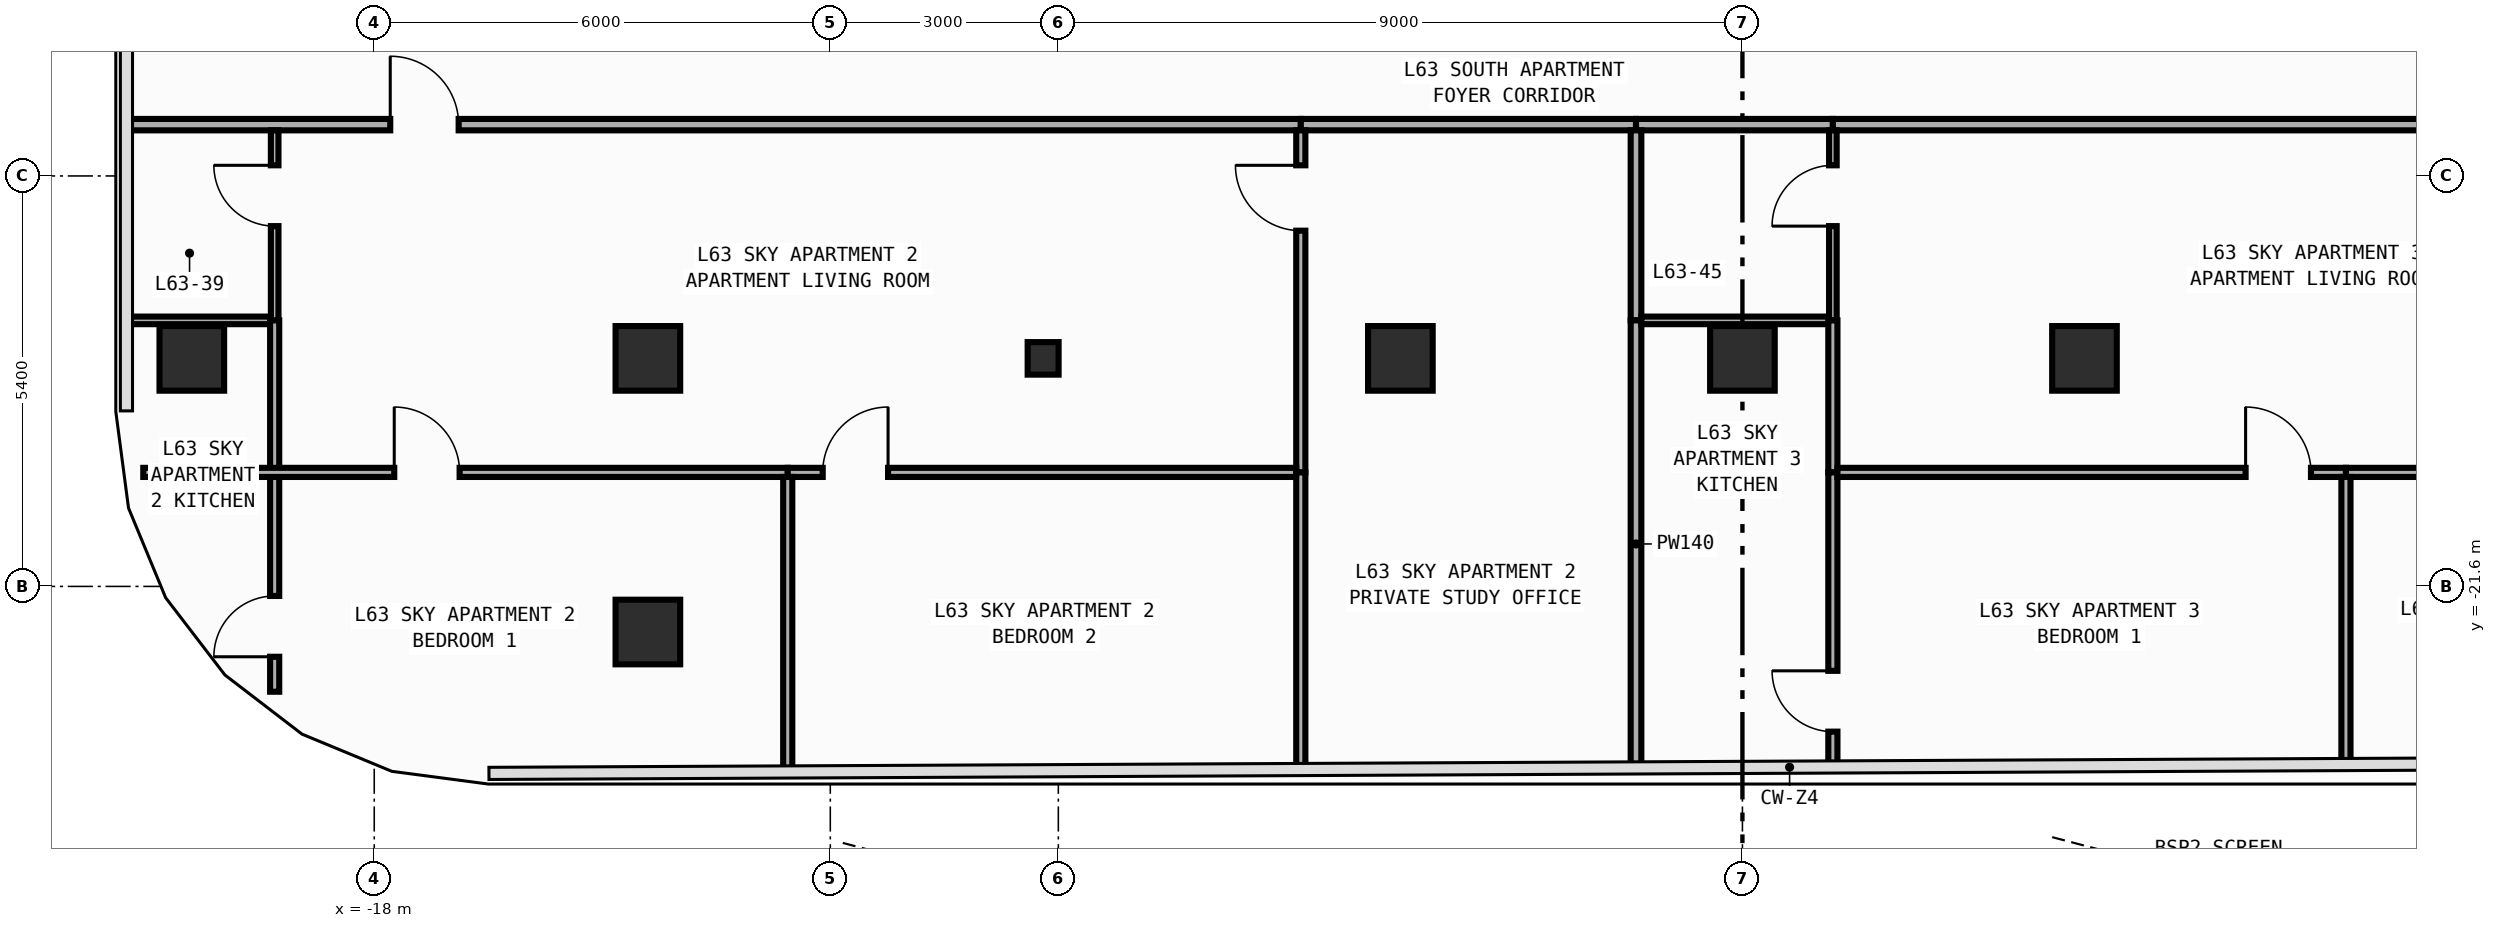
"""IFC4 building model, lengths in metres.
Left out: names, types, materials, properties, quantities, classifications, styles, units other than length and angle.
Written with IfcOpenShell. Run it as: python <this file> out.ifc"""

import sys

from ifc_helpers import new_model, si_unit, direction, frame, frame_2d, origin, origin_2d, place, context, subcontext, project, spatial, rectangle, i_section, extrude, element, fill, save


model = new_model("IFC4")
c1 = context("Model", 3, precision=1e-05, world=origin(), true_north=direction((0.0, 1.0)))
c2 = subcontext(c1, "Body", "Model", "MODEL_VIEW")
j1 = project(units=[si_unit("LENGTHUNIT", "METRE"), si_unit("PLANEANGLEUNIT", "RADIAN")], contexts=[c1])
p1 = place(None, origin())
s1 = spatial("IfcSite", under=j1, at=p1, CompositionType="ELEMENT")
p2 = place(p1, origin())
s2 = spatial("IfcBuilding", under=s1, at=p2, CompositionType="ELEMENT")
p3 = place(p2, frame((0.0, 0.0, 265.6)))
s3 = spatial("IfcBuildingStorey", under=s2, at=p3, CompositionType="ELEMENT", Elevation=265.6)
p4 = place(p3, frame((-9.2, -18.6, 0.0), z_axis=(0.0, 0.0, 1.0), x_axis=(1.0, 0.0, 0.0)))
e1 = element("IfcColumn", 1, at=p4, inside=s3, PredefinedType="COLUMN", context=c2, shape_type="SweptSolid", body=[
    extrude(i_section(OverallWidth=0.407, OverallDepth=0.428, WebThickness=0.02, FlangeThickness=0.035, FilletRadius=0.022, at=origin_2d()), origin(), (0.0, 0.0, 1.0), 3.6),
])
for number, where, z_axis, x_axis in (
    (2, (-20.4, -18.6, 0.0), (0.0, 0.0, 1.0), (1.0, 0.0, 0.0)),
    (3, (-14.4, -18.6, 0.0), (0.0, 0.0, 1.0), (1.0, 0.0, 0.0)),
    (4, (-4.5, -18.6, 0.0), (0.0, 0.0, 1.0), (1.0, 0.0, 0.0)),
    (5, (0.0, -18.6, 0.0), (0.0, 0.0, 1.0), (1.0, 0.0, 0.0)),
    (6, (4.5, -18.6, 0.0), (0.0, 0.0, 1.0), (1.0, 0.0, 0.0)),
    (7, (-14.4, -22.2, 0.0), (0.0, 0.0, 1.0), (1.0, 0.0, 0.0)),
):
    element("IfcColumn", number, at=place(p3, frame(where, z_axis=z_axis, x_axis=x_axis)), inside=s3, PredefinedType="COLUMN", context=c2, shape_type="SweptSolid", body=[
        extrude(rectangle(XDim=0.85, YDim=0.85, at=origin_2d()), origin(), (0.0, 0.0, 1.0), 3.6),
    ])
p5 = place(p3, frame((-21.255, -15.525, 0.0), z_axis=(0.0, 0.0, 1.0), x_axis=(1.0, 0.0, 0.0)))
e8 = element("IfcWall", 8, at=p5, inside=s3, PredefinedType="PARTITIONING", context=c2, shape_type="SweptSolid", body=[
    extrude(rectangle(XDim=15.445, YDim=0.15, at=frame_2d((7.722, 0.0))), origin(), (0.0, 0.0, 1.0), 3.34),
])
p6 = place(p5, frame((3.466, 0.0, 0.0)))
e9 = element("IfcOpeningElement", 9, at=p6, cuts=e8, PredefinedType="OPENING", context=c2, shape_type="SweptSolid", body=[
    extrude(rectangle(XDim=0.9, YDim=2.15, at=frame_2d((0.45, 1.075))), frame((0.0, 0.085, 0.0), z_axis=(0.0, -1.0, 0.0), x_axis=(1.0, 0.0, 0.0)), (0.0, 0.0, 1.0), 0.17),
])
p7 = place(p3, frame((-5.81, -15.525, 0.0), z_axis=(0.0, 0.0, 1.0), x_axis=(1.0, 0.0, 0.0)))
e10 = element("IfcWall", 10, at=p7, inside=s3, PredefinedType="PARTITIONING", context=c2, shape_type="SweptSolid", body=[
    extrude(rectangle(XDim=4.41, YDim=0.15, at=frame_2d((2.205, 0.0))), origin(), (0.0, 0.0, 1.0), 3.34),
])
p8 = place(p3, frame((-1.4, -15.525, 0.0), z_axis=(0.0, 0.0, 1.0), x_axis=(1.0, 0.0, 0.0)))
e11 = element("IfcWall", 11, at=p8, inside=s3, PredefinedType="PARTITIONING", context=c2, shape_type="SweptSolid", body=[
    extrude(rectangle(XDim=2.59, YDim=0.15, at=frame_2d((1.295, 0.0))), origin(), (0.0, 0.0, 1.0), 3.34),
])
p9 = place(p3, frame((1.19, -15.525, 0.0), z_axis=(0.0, 0.0, 1.0), x_axis=(1.0, 0.0, 0.0)))
e12 = element("IfcWall", 12, at=p9, inside=s3, PredefinedType="PARTITIONING", context=c2, shape_type="SweptSolid", body=[
    extrude(rectangle(XDim=11.05, YDim=0.15, at=frame_2d((5.525, 0.0))), origin(), (0.0, 0.0, 1.0), 3.34),
])
p10 = place(p9, frame((9.69, 0.0, 0.0)))
e13 = element("IfcOpeningElement", 13, at=p10, cuts=e12, PredefinedType="OPENING", context=c2, shape_type="SweptSolid", body=[
    extrude(rectangle(XDim=0.9, YDim=2.15, at=frame_2d((0.45, 1.075))), frame((0.0, 0.085, 0.0), z_axis=(0.0, -1.0, 0.0), x_axis=(1.0, 0.0, 0.0)), (0.0, 0.0, 1.0), 0.17),
])
p11 = place(p3, frame((-21.255, -18.1, 0.0), z_axis=(0.0, 0.0, 1.0), x_axis=(1.0, 0.0, 0.0)))
e14 = element("IfcWall", 14, at=p11, inside=s3, PredefinedType="PARTITIONING", context=c2, shape_type="SweptSolid", body=[
    extrude(rectangle(XDim=1.895, YDim=0.1, at=frame_2d((0.947, 0.0))), origin(), (0.0, 0.0, 1.0), 3.34),
])
p12 = place(p3, frame((-19.31, -18.1, 0.0), z_axis=(0.0, 0.0, 1.0), x_axis=(0.0, 1.0, 0.0)))
e15 = element("IfcWall", 15, at=p12, inside=s3, PredefinedType="PARTITIONING", context=c2, shape_type="SweptSolid", body=[
    extrude(rectangle(XDim=2.5, YDim=0.1, at=frame_2d((1.25, 0.0))), origin(), (0.0, 0.0, 1.0), 3.34),
])
p13 = place(p12, frame((1.24, 0.0, 0.0)))
e16 = element("IfcOpeningElement", 16, at=p13, cuts=e15, PredefinedType="OPENING", context=c2, shape_type="SweptSolid", body=[
    extrude(rectangle(XDim=0.8, YDim=2.1, at=frame_2d((0.4, 1.05))), frame((0.0, 0.06, 0.0), z_axis=(0.0, -1.0, 0.0), x_axis=(1.0, 0.0, 0.0)), (0.0, 0.0, 1.0), 0.12),
])
p14 = place(p3, frame((-19.31, -20.1, 0.0), z_axis=(0.0, 0.0, 1.0), x_axis=(0.0, 1.0, 0.0)))
e17 = element("IfcWall", 17, at=p14, inside=s3, PredefinedType="PARTITIONING", context=c2, shape_type="SweptSolid", body=[
    extrude(rectangle(XDim=2.0, YDim=0.12, at=frame_2d((1.0, 0.0))), origin(), (0.0, 0.0, 1.0), 3.34),
])
p15 = place(p3, frame((-19.31, -22.986, 0.0), z_axis=(0.0, 0.0, 1.0), x_axis=(0.0, 1.0, 0.0)))
e18 = element("IfcWall", 18, at=p15, inside=s3, PredefinedType="PARTITIONING", context=c2, shape_type="SweptSolid", body=[
    extrude(rectangle(XDim=2.885, YDim=0.12, at=frame_2d((1.443, 0.0))), origin(), (0.0, 0.0, 1.0), 3.34),
])
p16 = place(p15, frame((0.46, 0.0, 0.0)))
e19 = element("IfcOpeningElement", 19, at=p16, cuts=e18, PredefinedType="OPENING", context=c2, shape_type="SweptSolid", body=[
    extrude(rectangle(XDim=0.8, YDim=2.1, at=frame_2d((0.4, 1.05))), frame((0.0, 0.07, 0.0), z_axis=(0.0, -1.0, 0.0), x_axis=(1.0, 0.0, 0.0)), (0.0, 0.0, 1.0), 0.14),
])
p17 = place(p3, frame((-5.81, -20.1, 0.0), z_axis=(0.0, 0.0, 1.0), x_axis=(0.0, 1.0, 0.0)))
e20 = element("IfcWall", 20, at=p17, inside=s3, PredefinedType="PARTITIONING", context=c2, shape_type="SweptSolid", body=[
    extrude(rectangle(XDim=4.5, YDim=0.12, at=frame_2d((2.25, 0.0))), origin(), (0.0, 0.0, 1.0), 3.34),
])
p18 = place(p17, frame((3.18, 0.0, 0.0)))
e21 = element("IfcOpeningElement", 21, at=p18, cuts=e20, PredefinedType="OPENING", context=c2, shape_type="SweptSolid", body=[
    extrude(rectangle(XDim=0.86, YDim=2.15, at=frame_2d((0.43, 1.075))), frame((0.0, 0.07, 0.0), z_axis=(0.0, -1.0, 0.0), x_axis=(1.0, 0.0, 0.0)), (0.0, 0.0, 1.0), 0.14),
])
p19 = place(p3, frame((-21.039, -20.1, 0.0), z_axis=(0.0, 0.0, 1.0), x_axis=(1.0, 0.0, 0.0)))
e22 = element("IfcWall", 22, at=p19, inside=s3, PredefinedType="PARTITIONING", context=c2, shape_type="SweptSolid", body=[
    extrude(rectangle(XDim=8.479, YDim=0.12, at=frame_2d((4.239, 0.0))), origin(), (0.0, 0.0, 1.0), 3.34),
])
p20 = place(p19, frame((3.302, 0.0, 0.0)))
e23 = element("IfcOpeningElement", 23, at=p20, cuts=e22, PredefinedType="OPENING", context=c2, shape_type="SweptSolid", body=[
    extrude(rectangle(XDim=0.86, YDim=2.15, at=frame_2d((0.43, 1.075))), frame((0.0, 0.07, 0.0), z_axis=(0.0, -1.0, 0.0), x_axis=(1.0, 0.0, 0.0)), (0.0, 0.0, 1.0), 0.14),
])
p21 = place(p3, frame((-12.56, -20.1, 0.0), z_axis=(0.0, 0.0, 1.0), x_axis=(1.0, 0.0, 0.0)))
e24 = element("IfcWall", 24, at=p21, inside=s3, PredefinedType="PARTITIONING", context=c2, shape_type="SweptSolid", body=[
    extrude(rectangle(XDim=6.69, YDim=0.12, at=frame_2d((3.345, 0.0))), origin(), (0.0, 0.0, 1.0), 3.34),
])
p22 = place(p21, frame((0.46, 0.0, 0.0)))
e25 = element("IfcOpeningElement", 25, at=p22, cuts=e24, PredefinedType="OPENING", context=c2, shape_type="SweptSolid", body=[
    extrude(rectangle(XDim=0.86, YDim=2.15, at=frame_2d((0.43, 1.075))), frame((0.0, 0.07, 0.0), z_axis=(0.0, -1.0, 0.0), x_axis=(1.0, 0.0, 0.0)), (0.0, 0.0, 1.0), 0.14),
])
p23 = place(p3, frame((-5.81, -24.004, 0.0), z_axis=(0.0, 0.0, 1.0), x_axis=(0.0, 1.0, 0.0)))
e26 = element("IfcWall", 26, at=p23, inside=s3, PredefinedType="PARTITIONING", context=c2, shape_type="SweptSolid", body=[
    extrude(rectangle(XDim=3.904, YDim=0.12, at=frame_2d((1.952, 0.0))), origin(), (0.0, 0.0, 1.0), 3.34),
])
p24 = place(p3, frame((-1.4, -18.1, 0.0), z_axis=(0.0, 0.0, 1.0), x_axis=(0.0, 1.0, 0.0)))
e27 = element("IfcWall", 27, at=p24, inside=s3, PredefinedType="PARTITIONING", context=c2, shape_type="SweptSolid", body=[
    extrude(rectangle(XDim=2.5, YDim=0.14, at=frame_2d((1.25, 0.0))), origin(), (0.0, 0.0, 1.0), 3.34),
])
p25 = place(p3, frame((-1.4, -23.983, 0.0), z_axis=(0.0, 0.0, 1.0), x_axis=(0.0, 1.0, 0.0)))
e28 = element("IfcWall", 28, at=p25, inside=s3, PredefinedType="PARTITIONING", context=c2, shape_type="SweptSolid", body=[
    extrude(rectangle(XDim=5.883, YDim=0.14, at=frame_2d((2.941, 0.0))), origin(), (0.0, 0.0, 1.0), 3.34),
])
p26 = place(p3, frame((-12.56, -24.036, 0.0), z_axis=(0.0, 0.0, 1.0), x_axis=(0.0, 1.0, 0.0)))
e29 = element("IfcWall", 29, at=p26, inside=s3, PredefinedType="PARTITIONING", context=c2, shape_type="SweptSolid", body=[
    extrude(rectangle(XDim=3.876, YDim=0.12, at=frame_2d((1.938, 0.0))), origin(), (0.0, 0.0, 1.0), 3.34),
])
p27 = place(p3, frame((-1.33, -18.1, 0.0), z_axis=(0.0, 0.0, 1.0), x_axis=(1.0, 0.0, 0.0)))
e30 = element("IfcWall", 30, at=p27, inside=s3, PredefinedType="PARTITIONING", context=c2, shape_type="SweptSolid", body=[
    extrude(rectangle(XDim=2.47, YDim=0.1, at=frame_2d((1.235, 0.0))), origin(), (0.0, 0.0, 1.0), 3.34),
])
p28 = place(p3, frame((1.19, -18.1, 0.0), z_axis=(0.0, 0.0, 1.0), x_axis=(0.0, 1.0, 0.0)))
e31 = element("IfcWall", 31, at=p28, inside=s3, PredefinedType="PARTITIONING", context=c2, shape_type="SweptSolid", body=[
    extrude(rectangle(XDim=2.5, YDim=0.1, at=frame_2d((1.25, 0.0))), origin(), (0.0, 0.0, 1.0), 3.34),
])
p29 = place(p28, frame((1.24, 0.0, 0.0)))
e32 = element("IfcOpeningElement", 32, at=p29, cuts=e31, PredefinedType="OPENING", context=c2, shape_type="SweptSolid", body=[
    extrude(rectangle(XDim=0.8, YDim=2.1, at=frame_2d((0.4, 1.05))), frame((0.0, 0.06, 0.0), z_axis=(0.0, -1.0, 0.0), x_axis=(1.0, 0.0, 0.0)), (0.0, 0.0, 1.0), 0.12),
])
p30 = place(p3, frame((1.19, -20.1, 0.0), z_axis=(0.0, 0.0, 1.0), x_axis=(0.0, 1.0, 0.0)))
e33 = element("IfcWall", 33, at=p30, inside=s3, PredefinedType="PARTITIONING", context=c2, shape_type="SweptSolid", body=[
    extrude(rectangle(XDim=2.0, YDim=0.12, at=frame_2d((1.0, 0.0))), origin(), (0.0, 0.0, 1.0), 3.34),
])
p31 = place(p3, frame((1.19, -23.971, 0.0), z_axis=(0.0, 0.0, 1.0), x_axis=(0.0, 1.0, 0.0)))
e34 = element("IfcWall", 34, at=p31, inside=s3, PredefinedType="PARTITIONING", context=c2, shape_type="SweptSolid", body=[
    extrude(rectangle(XDim=3.871, YDim=0.12, at=frame_2d((1.935, 0.0))), origin(), (0.0, 0.0, 1.0), 3.34),
])
p32 = place(p31, frame((0.46, 0.0, 0.0)))
e35 = element("IfcOpeningElement", 35, at=p32, cuts=e34, PredefinedType="OPENING", context=c2, shape_type="SweptSolid", body=[
    extrude(rectangle(XDim=0.8, YDim=2.1, at=frame_2d((0.4, 1.05))), frame((0.0, 0.07, 0.0), z_axis=(0.0, -1.0, 0.0), x_axis=(1.0, 0.0, 0.0)), (0.0, 0.0, 1.0), 0.14),
])
p33 = place(p3, frame((1.25, -20.1, 0.0), z_axis=(0.0, 0.0, 1.0), x_axis=(1.0, 0.0, 0.0)))
e36 = element("IfcWall", 36, at=p33, inside=s3, PredefinedType="PARTITIONING", context=c2, shape_type="SweptSolid", body=[
    extrude(rectangle(XDim=6.69, YDim=0.12, at=frame_2d((3.345, 0.0))), origin(), (0.0, 0.0, 1.0), 3.34),
])
p34 = place(p33, frame((5.37, 0.0, 0.0)))
e37 = element("IfcOpeningElement", 37, at=p34, cuts=e36, PredefinedType="OPENING", context=c2, shape_type="SweptSolid", body=[
    extrude(rectangle(XDim=0.86, YDim=2.15, at=frame_2d((0.43, 1.075))), frame((0.0, 0.07, 0.0), z_axis=(0.0, -1.0, 0.0), x_axis=(1.0, 0.0, 0.0)), (0.0, 0.0, 1.0), 0.14),
])
p35 = place(p3, frame((7.94, -20.1, 0.0), z_axis=(0.0, 0.0, 1.0), x_axis=(1.0, 0.0, 0.0)))
e38 = element("IfcWall", 38, at=p35, inside=s3, PredefinedType="PARTITIONING", context=c2, shape_type="SweptSolid", body=[
    extrude(rectangle(XDim=6.81, YDim=0.12, at=frame_2d((3.405, 0.0))), origin(), (0.0, 0.0, 1.0), 3.34),
])
p36 = place(p35, frame((3.076, 0.0, 0.0)))
e39 = element("IfcOpeningElement", 39, at=p36, cuts=e38, PredefinedType="OPENING", context=c2, shape_type="SweptSolid", body=[
    extrude(rectangle(XDim=0.86, YDim=2.15, at=frame_2d((0.43, 1.075))), frame((0.0, 0.07, 0.0), z_axis=(0.0, -1.0, 0.0), x_axis=(1.0, 0.0, 0.0)), (0.0, 0.0, 1.0), 0.14),
])
p37 = place(p3, frame((7.94, -23.938, 0.0), z_axis=(0.0, 0.0, 1.0), x_axis=(0.0, 1.0, 0.0)))
e40 = element("IfcWall", 40, at=p37, inside=s3, PredefinedType="PARTITIONING", context=c2, shape_type="SweptSolid", body=[
    extrude(rectangle(XDim=3.779, YDim=0.12, at=frame_2d((1.889, 0.0))), origin(), (0.0, 0.0, 1.0), 3.34),
])
p38 = place(p6, origin())
e41 = element("IfcDoor", 41, at=p38, inside=s3, OperationType="SINGLE_SWING_LEFT", PredefinedType="DOOR", context=c2, shape_type="SweptSolid", body=[
    extrude(rectangle(XDim=0.9, YDim=2.15, at=frame_2d((0.45, 1.075))), frame((0.0, 0.025, 0.0), z_axis=(0.0, -1.0, 0.0), x_axis=(1.0, 0.0, 0.0)), (0.0, 0.0, 1.0), 0.05),
])
fill(e9, e41)
p39 = place(p13, origin())
e42 = element("IfcDoor", 42, at=p39, inside=s3, OperationType="SINGLE_SWING_RIGHT", PredefinedType="DOOR", context=c2, shape_type="SweptSolid", body=[
    extrude(rectangle(XDim=0.8, YDim=2.1, at=frame_2d((0.4, 1.05))), frame((0.0, 0.025, 0.0), z_axis=(0.0, -1.0, 0.0), x_axis=(1.0, 0.0, 0.0)), (0.0, 0.0, 1.0), 0.05),
])
fill(e16, e42)
p40 = place(p18, origin())
e43 = element("IfcDoor", 43, at=p40, inside=s3, OperationType="SINGLE_SWING_RIGHT", PredefinedType="DOOR", context=c2, shape_type="SweptSolid", body=[
    extrude(rectangle(XDim=0.86, YDim=2.15, at=frame_2d((0.43, 1.075))), frame((0.0, 0.025, 0.0), z_axis=(0.0, -1.0, 0.0), x_axis=(1.0, 0.0, 0.0)), (0.0, 0.0, 1.0), 0.05),
])
fill(e21, e43)
p41 = place(p20, origin())
e44 = element("IfcDoor", 44, at=p41, inside=s3, OperationType="SINGLE_SWING_LEFT", PredefinedType="DOOR", context=c2, shape_type="SweptSolid", body=[
    extrude(rectangle(XDim=0.86, YDim=2.15, at=frame_2d((0.43, 1.075))), frame((0.0, 0.025, 0.0), z_axis=(0.0, -1.0, 0.0), x_axis=(1.0, 0.0, 0.0)), (0.0, 0.0, 1.0), 0.05),
])
fill(e23, e44)
p42 = place(p22, origin())
e45 = element("IfcDoor", 45, at=p42, inside=s3, OperationType="SINGLE_SWING_RIGHT", PredefinedType="DOOR", context=c2, shape_type="SweptSolid", body=[
    extrude(rectangle(XDim=0.86, YDim=2.15, at=frame_2d((0.43, 1.075))), frame((0.0, 0.025, 0.0), z_axis=(0.0, -1.0, 0.0), x_axis=(1.0, 0.0, 0.0)), (0.0, 0.0, 1.0), 0.05),
])
fill(e25, e45)
p43 = place(p29, origin())
e46 = element("IfcDoor", 46, at=p43, inside=s3, OperationType="SINGLE_SWING_LEFT", PredefinedType="DOOR", context=c2, shape_type="SweptSolid", body=[
    extrude(rectangle(XDim=0.8, YDim=2.1, at=frame_2d((0.4, 1.05))), frame((0.0, 0.025, 0.0), z_axis=(0.0, -1.0, 0.0), x_axis=(1.0, 0.0, 0.0)), (0.0, 0.0, 1.0), 0.05),
])
fill(e32, e46)
p44 = place(p34, origin())
e47 = element("IfcDoor", 47, at=p44, inside=s3, OperationType="SINGLE_SWING_LEFT", PredefinedType="DOOR", context=c2, shape_type="SweptSolid", body=[
    extrude(rectangle(XDim=0.86, YDim=2.15, at=frame_2d((0.43, 1.075))), frame((0.0, 0.025, 0.0), z_axis=(0.0, -1.0, 0.0), x_axis=(1.0, 0.0, 0.0)), (0.0, 0.0, 1.0), 0.05),
])
fill(e37, e47)
p45 = place(p32, origin())
e48 = element("IfcDoor", 48, at=p45, inside=s3, OperationType="SINGLE_SWING_RIGHT", PredefinedType="DOOR", context=c2, shape_type="SweptSolid", body=[
    extrude(rectangle(XDim=0.8, YDim=2.1, at=frame_2d((0.4, 1.05))), frame((0.0, 0.025, 0.0), z_axis=(0.0, -1.0, 0.0), x_axis=(1.0, 0.0, 0.0)), (0.0, 0.0, 1.0), 0.05),
])
fill(e35, e48)
p46 = place(p16, origin())
e49 = element("IfcDoor", 49, at=p46, inside=s3, OperationType="SINGLE_SWING_LEFT", PredefinedType="DOOR", context=c2, shape_type="SweptSolid", body=[
    extrude(rectangle(XDim=0.8, YDim=2.1, at=frame_2d((0.4, 1.05))), frame((0.0, 0.025, 0.0), z_axis=(0.0, -1.0, 0.0), x_axis=(1.0, 0.0, 0.0)), (0.0, 0.0, 1.0), 0.05),
])
fill(e19, e49)
save(model, sys.argv[1])
